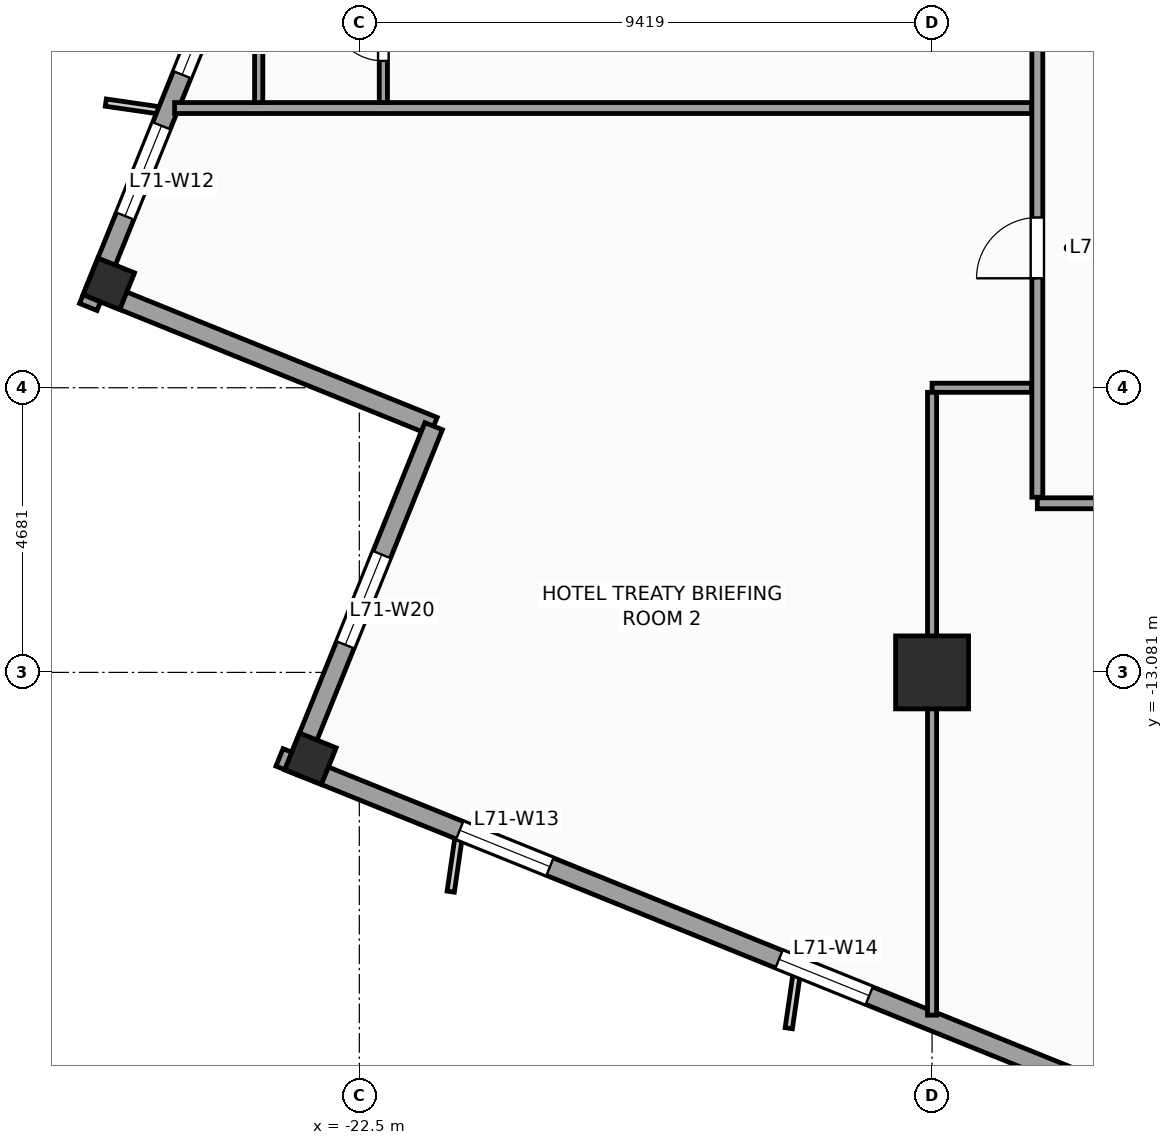
"""IFC4 building model, lengths in metres.
Left out: names, types, materials, properties, quantities, classifications, styles, units other than length and angle.
Written with IfcOpenShell. Run it as: python <this file> out.ifc"""

import sys

from ifc_helpers import new_model, si_unit, direction, frame, frame_2d, origin, origin_2d, place, context, subcontext, project, spatial, rectangle, extrude, source, transform, mapped, element, fill, save


model = new_model("IFC4")
c1 = context("Model", 3, precision=1e-05, world=origin(), true_north=direction((0.0, 1.0)))
c2 = subcontext(c1, "Body", "Model", "MODEL_VIEW")
j1 = project(units=[si_unit("LENGTHUNIT", "METRE"), si_unit("PLANEANGLEUNIT", "RADIAN")], contexts=[c1])
p1 = place(None, origin())
s1 = spatial("IfcSite", under=j1, at=p1, CompositionType="ELEMENT")
p2 = place(p1, origin())
s2 = spatial("IfcBuilding", under=s1, at=p2, CompositionType="ELEMENT")
p3 = place(p2, frame((0.0, 0.0, 290.4)))
s3 = spatial("IfcBuildingStorey", under=s2, at=p3, CompositionType="ELEMENT", Elevation=290.4)
m1 = source(origin(), c2, "Body", "SweptSolid", [
    extrude(rectangle(XDim=1.2, YDim=1.2, at=origin_2d()), origin(), (0.0, 0.0, 1.0), 3.6),
])
p4 = place(p3, frame((-13.081, -13.081, 0.0), z_axis=(0.0, 0.0, 1.0), x_axis=(1.0, 0.0, 0.0)))
e1 = element("IfcColumn", 1, at=p4, inside=s3, PredefinedType="COLUMN", context=c2, shape_type="MappedRepresentation", body=[
    mapped(m1, transform((0.0, 0.0, 0.0), scale=1.0)),
])
m2 = source(origin(), c2, "Body", "SweptSolid", [
    extrude(rectangle(XDim=0.65, YDim=0.65, at=origin_2d()), origin(), (0.0, 0.0, 1.0), 3.6),
])
for number, where, z_axis, x_axis in (
    (2, (-26.62, -6.69, 0.0), (0.0, 0.0, 1.0), (0.375, 0.927, 0.0)),
    (3, (-23.304, -14.501, 0.0), (0.0, 0.0, 1.0), (0.375, 0.927, 0.0)),
):
    element("IfcColumn", number, at=place(p3, frame(where, z_axis=z_axis, x_axis=x_axis)), inside=s3, PredefinedType="COLUMN", context=c2, shape_type="MappedRepresentation", body=[
        mapped(m2, transform((0.0, 0.0, 0.0), scale=1.0)),
    ])
p5 = place(p3, frame((-14.479, 23.813, 0.0), z_axis=(0.0, 0.0, 1.0), x_axis=(-0.374609557019, -0.927182657188, 0.0)))
e4 = element("IfcWall", 4, at=p5, inside=s3, PredefinedType="STANDARD", context=c2, shape_type="SweptSolid", body=[
    extrude(rectangle(XDim=33.31, YDim=0.31, at=frame_2d((16.655, 0.0))), origin(), (0.0, 0.0, 1.0), 2.75),
])
p6 = place(p5, frame((21.73, 0.0, 0.0)))
e5 = element("IfcOpeningElement", 5, at=p6, cuts=e4, PredefinedType="OPENING", context=c2, shape_type="SweptSolid", body=[
    extrude(rectangle(XDim=1.05, YDim=2.25, at=frame_2d((0.525, 1.125))), frame((0.0, 0.165, 0.0), z_axis=(0.0, -1.0, 0.0), x_axis=(1.0, 0.0, 0.0)), (0.0, 0.0, 1.0), 0.33),
])
p7 = place(p5, frame((3.197, 0.0, 0.47)))
e6 = element("IfcOpeningElement", 6, at=p7, cuts=e4, PredefinedType="OPENING", context=c2, shape_type="SweptSolid", body=[
    extrude(rectangle(XDim=1.6, YDim=2.1, at=frame_2d((0.8, 1.05))), frame((0.0, 0.165, 0.0), z_axis=(0.0, -1.0, 0.0), x_axis=(1.0, 0.0, 0.0)), (0.0, 0.0, 1.0), 0.33),
])
p8 = place(p5, frame((8.86, 0.0, 0.47)))
e7 = element("IfcOpeningElement", 7, at=p8, cuts=e4, PredefinedType="OPENING", context=c2, shape_type="SweptSolid", body=[
    extrude(rectangle(XDim=1.6, YDim=2.1, at=frame_2d((0.8, 1.05))), frame((0.0, 0.165, 0.0), z_axis=(0.0, -1.0, 0.0), x_axis=(1.0, 0.0, 0.0)), (0.0, 0.0, 1.0), 0.33),
])
p9 = place(p5, frame((14.439, 0.0, 0.47)))
e8 = element("IfcOpeningElement", 8, at=p9, cuts=e4, PredefinedType="OPENING", context=c2, shape_type="SweptSolid", body=[
    extrude(rectangle(XDim=1.6, YDim=2.1, at=frame_2d((0.8, 1.05))), frame((0.0, 0.165, 0.0), z_axis=(0.0, -1.0, 0.0), x_axis=(1.0, 0.0, 0.0)), (0.0, 0.0, 1.0), 0.33),
])
p10 = place(p5, frame((30.097, 0.0, 0.47)))
e9 = element("IfcOpeningElement", 9, at=p10, cuts=e4, PredefinedType="OPENING", context=c2, shape_type="SweptSolid", body=[
    extrude(rectangle(XDim=1.6, YDim=2.1, at=frame_2d((0.8, 1.05))), frame((0.0, 0.165, 0.0), z_axis=(0.0, -1.0, 0.0), x_axis=(1.0, 0.0, 0.0)), (0.0, 0.0, 1.0), 0.33),
])
p11 = place(p5, frame((27.59, 0.0, 0.47)))
e10 = element("IfcOpeningElement", 10, at=p11, cuts=e4, PredefinedType="OPENING", context=c2, shape_type="SweptSolid", body=[
    extrude(rectangle(XDim=1.6, YDim=2.1, at=frame_2d((0.8, 1.05))), frame((0.0, 0.165, 0.0), z_axis=(0.0, -1.0, 0.0), x_axis=(1.0, 0.0, 0.0)), (0.0, 0.0, 1.0), 0.33),
])
p12 = place(p3, frame((-26.841, -6.784, 0.0), z_axis=(0.0, 0.0, 1.0), x_axis=(0.927171722085, -0.374636620962, 0.0)))
e11 = element("IfcWall", 11, at=p12, inside=s3, PredefinedType="STANDARD", context=c2, shape_type="SweptSolid", body=[
    extrude(rectangle(XDim=6.0, YDim=0.31, at=frame_2d((3.0, 0.0))), origin(), (0.0, 0.0, 1.0), 2.65),
])
p13 = place(p3, frame((-21.278, -9.032, 0.0), z_axis=(0.0, 0.0, 1.0), x_axis=(-0.374602739196, -0.927185411764, 0.0)))
e12 = element("IfcWall", 12, at=p13, inside=s3, PredefinedType="STANDARD", context=c2, shape_type="SweptSolid", body=[
    extrude(rectangle(XDim=6.155, YDim=0.31, at=frame_2d((3.078, 0.0))), origin(), (0.0, 0.0, 1.0), 3.35),
])
p14 = place(p13, frame((2.278, 0.0, 0.47)))
e13 = element("IfcOpeningElement", 13, at=p14, cuts=e12, PredefinedType="OPENING", context=c2, shape_type="SweptSolid", body=[
    extrude(rectangle(XDim=1.6, YDim=2.1, at=frame_2d((0.8, 1.05))), frame((0.0, 0.165, 0.0), z_axis=(0.0, -1.0, 0.0), x_axis=(1.0, 0.0, 0.0)), (0.0, 0.0, 1.0), 0.33),
])
p15 = place(p3, frame((-23.813, -14.479, 0.0), z_axis=(0.0, 0.0, 1.0), x_axis=(0.927182657188, -0.374609557019, 0.0)))
e14 = element("IfcWall", 14, at=p15, inside=s3, PredefinedType="STANDARD", context=c2, shape_type="SweptSolid", body=[
    extrude(rectangle(XDim=33.31, YDim=0.31, at=frame_2d((16.655, 0.0))), origin(), (0.0, 0.0, 1.0), 2.75),
])
p16 = place(p15, frame((3.197, 0.0, 0.47)))
e15 = element("IfcOpeningElement", 15, at=p16, cuts=e14, PredefinedType="OPENING", context=c2, shape_type="SweptSolid", body=[
    extrude(rectangle(XDim=1.6, YDim=2.1, at=frame_2d((0.8, 1.05))), frame((0.0, 0.165, 0.0), z_axis=(0.0, -1.0, 0.0), x_axis=(1.0, 0.0, 0.0)), (0.0, 0.0, 1.0), 0.33),
])
p17 = place(p15, frame((8.86, 0.0, 0.47)))
e16 = element("IfcOpeningElement", 16, at=p17, cuts=e14, PredefinedType="OPENING", context=c2, shape_type="SweptSolid", body=[
    extrude(rectangle(XDim=1.6, YDim=2.1, at=frame_2d((0.8, 1.05))), frame((0.0, 0.165, 0.0), z_axis=(0.0, -1.0, 0.0), x_axis=(1.0, 0.0, 0.0)), (0.0, 0.0, 1.0), 0.33),
])
p18 = place(p15, frame((14.439, 0.0, 0.47)))
e17 = element("IfcOpeningElement", 17, at=p18, cuts=e14, PredefinedType="OPENING", context=c2, shape_type="SweptSolid", body=[
    extrude(rectangle(XDim=1.6, YDim=2.1, at=frame_2d((0.8, 1.05))), frame((0.0, 0.165, 0.0), z_axis=(0.0, -1.0, 0.0), x_axis=(1.0, 0.0, 0.0)), (0.0, 0.0, 1.0), 0.33),
])
p19 = place(p15, frame((21.851, 0.0, 0.47)))
e18 = element("IfcOpeningElement", 18, at=p19, cuts=e14, PredefinedType="OPENING", context=c2, shape_type="SweptSolid", body=[
    extrude(rectangle(XDim=1.6, YDim=2.1, at=frame_2d((0.8, 1.05))), frame((0.0, 0.165, 0.0), z_axis=(0.0, -1.0, 0.0), x_axis=(1.0, 0.0, 0.0)), (0.0, 0.0, 1.0), 0.33),
])
p20 = place(p15, frame((27.847, 0.0, 0.47)))
e19 = element("IfcOpeningElement", 19, at=p20, cuts=e14, PredefinedType="OPENING", context=c2, shape_type="SweptSolid", body=[
    extrude(rectangle(XDim=1.6, YDim=2.1, at=frame_2d((0.8, 1.05))), frame((0.0, 0.165, 0.0), z_axis=(0.0, -1.0, 0.0), x_axis=(1.0, 0.0, 0.0)), (0.0, 0.0, 1.0), 0.33),
])
p21 = place(p3, frame((-11.35, -10.3, 0.0), z_axis=(0.0, 0.0, 1.0), x_axis=(1.0, 0.0, 0.0)))
e20 = element("IfcWall", 20, at=p21, inside=s3, PredefinedType="PARTITIONING", context=c2, shape_type="SweptSolid", body=[
    extrude(rectangle(XDim=22.8, YDim=0.18, at=frame_2d((11.4, 0.0))), origin(), (0.0, 0.0, 1.0), 3.35),
])
p22 = place(p21, frame((12.336, 0.0, 0.0)))
e21 = element("IfcOpeningElement", 21, at=p22, cuts=e20, PredefinedType="OPENING", context=c2, shape_type="SweptSolid", body=[
    extrude(rectangle(XDim=0.95, YDim=2.1, at=frame_2d((0.475, 1.05))), frame((0.0, 0.1, 0.0), z_axis=(0.0, -1.0, 0.0), x_axis=(1.0, 0.0, 0.0)), (0.0, 0.0, 1.0), 0.2),
])
p23 = place(p21, frame((17.71, 0.0, 0.0)))
e22 = element("IfcOpeningElement", 22, at=p23, cuts=e20, PredefinedType="OPENING", context=c2, shape_type="SweptSolid", body=[
    extrude(rectangle(XDim=1.0, YDim=2.15, at=frame_2d((0.5, 1.075))), frame((0.0, 0.1, 0.0), z_axis=(0.0, -1.0, 0.0), x_axis=(1.0, 0.0, 0.0)), (0.0, 0.0, 1.0), 0.2),
])
p24 = place(p21, frame((5.339, 0.0, 0.0)))
e23 = element("IfcOpeningElement", 23, at=p24, cuts=e20, PredefinedType="OPENING", context=c2, shape_type="SweptSolid", body=[
    extrude(rectangle(XDim=1.0, YDim=2.15, at=frame_2d((0.5, 1.075))), frame((0.0, 0.1, 0.0), z_axis=(0.0, -1.0, 0.0), x_axis=(1.0, 0.0, 0.0)), (0.0, 0.0, 1.0), 0.2),
])
p25 = place(p3, frame((-11.35, -10.2, 0.0), z_axis=(0.0, 0.0, 1.0), x_axis=(0.0, 1.0, 0.0)))
e24 = element("IfcWall", 24, at=p25, inside=s3, PredefinedType="PARTITIONING", context=c2, shape_type="SweptSolid", body=[
    extrude(rectangle(XDim=22.55, YDim=0.18, at=frame_2d((11.275, 0.0))), origin(), (0.0, 0.0, 1.0), 3.35),
])
p26 = place(p25, frame((11.6, 0.0, 0.0)))
e25 = element("IfcOpeningElement", 25, at=p26, cuts=e24, PredefinedType="OPENING", context=c2, shape_type="SweptSolid", body=[
    extrude(rectangle(XDim=1.0, YDim=2.15, at=frame_2d((0.5, 1.075))), frame((0.0, 0.1, 0.0), z_axis=(0.0, -1.0, 0.0), x_axis=(1.0, 0.0, 0.0)), (0.0, 0.0, 1.0), 0.2),
])
p27 = place(p25, frame((15.8, 0.0, 0.0)))
e26 = element("IfcOpeningElement", 26, at=p27, cuts=e24, PredefinedType="OPENING", context=c2, shape_type="SweptSolid", body=[
    extrude(rectangle(XDim=1.0, YDim=2.15, at=frame_2d((0.5, 1.075))), frame((0.0, 0.1, 0.0), z_axis=(0.0, -1.0, 0.0), x_axis=(1.0, 0.0, 0.0)), (0.0, 0.0, 1.0), 0.2),
])
p28 = place(p25, frame((3.6, 0.0, 0.0)))
e27 = element("IfcOpeningElement", 27, at=p28, cuts=e24, PredefinedType="OPENING", context=c2, shape_type="SweptSolid", body=[
    extrude(rectangle(XDim=1.0, YDim=2.15, at=frame_2d((0.5, 1.075))), frame((0.0, 0.1, 0.0), z_axis=(0.0, -1.0, 0.0), x_axis=(1.0, 0.0, 0.0)), (0.0, 0.0, 1.0), 0.2),
])
p29 = place(p25, frame((7.8, 0.0, 0.0)))
e28 = element("IfcOpeningElement", 28, at=p29, cuts=e24, PredefinedType="OPENING", context=c2, shape_type="SweptSolid", body=[
    extrude(rectangle(XDim=1.0, YDim=2.15, at=frame_2d((0.5, 1.075))), frame((0.0, 0.1, 0.0), z_axis=(0.0, -1.0, 0.0), x_axis=(1.0, 0.0, 0.0)), (0.0, 0.0, 1.0), 0.2),
])
p30 = place(p3, frame((-11.445, -3.8, 0.0), z_axis=(0.0, 0.0, 1.0), x_axis=(-1.0, 0.0, 0.0)))
e29 = element("IfcWall", 29, at=p30, inside=s3, PredefinedType="PARTITIONING", context=c2, shape_type="SweptSolid", body=[
    extrude(rectangle(XDim=14.093, YDim=0.18, at=frame_2d((7.046, 0.0))), origin(), (0.0, 0.0, 1.0), 3.35),
])
p31 = place(p3, frame((-11.445, -8.4, 0.0), z_axis=(0.0, 0.0, 1.0), x_axis=(-1.0, 0.0, 0.0)))
e30 = element("IfcWall", 30, at=p31, inside=s3, PredefinedType="PARTITIONING", context=c2, shape_type="SweptSolid", body=[
    extrude(rectangle(XDim=1.636, YDim=0.15, at=frame_2d((0.818, 0.0))), origin(), (0.0, 0.0, 1.0), 3.35),
])
p32 = place(p3, frame((-13.081, -8.475, 0.0), z_axis=(0.0, 0.0, 1.0), x_axis=(0.0, -1.0, 0.0)))
e31 = element("IfcWall", 31, at=p32, inside=s3, PredefinedType="PARTITIONING", context=c2, shape_type="SweptSolid", body=[
    extrude(rectangle(XDim=10.243, YDim=0.15, at=frame_2d((5.121, 0.0))), origin(), (0.0, 0.0, 1.0), 2.45),
])
p33 = place(p3, frame((-22.105, -3.71, 0.0), z_axis=(0.0, 0.0, 1.0), x_axis=(0.0, 1.0, 0.0)))
e32 = element("IfcWall", 32, at=p33, inside=s3, PredefinedType="PARTITIONING", context=c2, shape_type="SweptSolid", body=[
    extrude(rectangle(XDim=2.25, YDim=0.135, at=frame_2d((1.125, 0.0))), origin(), (0.0, 0.0, 1.0), 3.35),
])
p34 = place(p33, frame((0.685, 0.0, 0.0)))
e33 = element("IfcOpeningElement", 33, at=p34, cuts=e32, PredefinedType="OPENING", context=c2, shape_type="SweptSolid", body=[
    extrude(rectangle(XDim=0.88, YDim=2.1, at=frame_2d((0.44, 1.05))), frame((0.0, 0.078, 0.0), z_axis=(0.0, -1.0, 0.0), x_axis=(1.0, 0.0, 0.0)), (0.0, 0.0, 1.0), 0.155),
])
p35 = place(p3, frame((-24.155, -3.71, 0.0), z_axis=(0.0, 0.0, 1.0), x_axis=(0.0, 1.0, 0.0)))
e34 = element("IfcWall", 34, at=p35, inside=s3, PredefinedType="PARTITIONING", context=c2, shape_type="SweptSolid", body=[
    extrude(rectangle(XDim=2.25, YDim=0.135, at=frame_2d((1.125, 0.0))), origin(), (0.0, 0.0, 1.0), 3.35),
])
m3 = source(origin(), c2, "Body", "SweptSolid", [
    extrude(rectangle(XDim=1.6, YDim=2.1, at=frame_2d((0.8, 1.05))), frame((0.0, 0.03, 0.0), z_axis=(0.0, -1.0, 0.0), x_axis=(1.0, 0.0, 0.0)), (0.0, 0.0, 1.0), 0.06),
])
p36 = place(p10, origin())
e35 = element("IfcWindow", 35, at=p36, inside=s3, PartitioningType="SINGLE_PANEL", PredefinedType="WINDOW", context=c2, shape_type="MappedRepresentation", body=[
    mapped(m3, transform((0.0, 0.0, 0.0), scale=1.0)),
])
fill(e9, e35)
p37 = place(p16, origin())
e36 = element("IfcWindow", 36, at=p37, inside=s3, PartitioningType="SINGLE_PANEL", PredefinedType="WINDOW", context=c2, shape_type="MappedRepresentation", body=[
    mapped(m3, transform((0.0, 0.0, 0.0), scale=1.0)),
])
fill(e15, e36)
p38 = place(p17, origin())
e37 = element("IfcWindow", 37, at=p38, inside=s3, PartitioningType="SINGLE_PANEL", PredefinedType="WINDOW", context=c2, shape_type="MappedRepresentation", body=[
    mapped(m3, transform((0.0, 0.0, 0.0), scale=1.0)),
])
fill(e16, e37)
p39 = place(p14, origin())
e38 = element("IfcWindow", 38, at=p39, inside=s3, PartitioningType="SINGLE_PANEL", PredefinedType="WINDOW", context=c2, shape_type="MappedRepresentation", body=[
    mapped(m3, transform((0.0, 0.0, 0.0), scale=1.0)),
])
fill(e13, e38)
m4 = source(origin(), c2, "Body", "SweptSolid", [
    extrude(rectangle(XDim=1.0, YDim=2.15, at=frame_2d((0.5, 1.075))), frame((0.0, 0.025, 0.0), z_axis=(0.0, -1.0, 0.0), x_axis=(1.0, 0.0, 0.0)), (0.0, 0.0, 1.0), 0.05),
])
p40 = place(p28, origin())
e39 = element("IfcDoor", 39, at=p40, inside=s3, OperationType="SINGLE_SWING_LEFT", PredefinedType="DOOR", context=c2, shape_type="MappedRepresentation", body=[
    mapped(m4, transform((0.0, 0.0, 0.0), scale=1.0)),
])
fill(e27, e39)
m5 = source(origin(), c2, "Body", "SweptSolid", [
    extrude(rectangle(XDim=0.88, YDim=2.1, at=frame_2d((0.44, 1.05))), frame((0.0, 0.025, 0.0), z_axis=(0.0, -1.0, 0.0), x_axis=(1.0, 0.0, 0.0)), (0.0, 0.0, 1.0), 0.05),
])
p41 = place(p34, origin())
e40 = element("IfcDoor", 40, at=p41, inside=s3, OperationType="SINGLE_SWING_RIGHT", PredefinedType="DOOR", context=c2, shape_type="MappedRepresentation", body=[
    mapped(m5, transform((0.0, 0.0, 0.0), scale=1.0)),
])
fill(e33, e40)
p42 = place(p11, origin())
e41 = element("IfcWindow", 41, at=p42, inside=s3, PartitioningType="SINGLE_PANEL", PredefinedType="WINDOW", context=c2, shape_type="MappedRepresentation", body=[
    mapped(m3, transform((0.0, 0.0, 0.0), scale=1.0)),
])
fill(e10, e41)
save(model, sys.argv[1])
